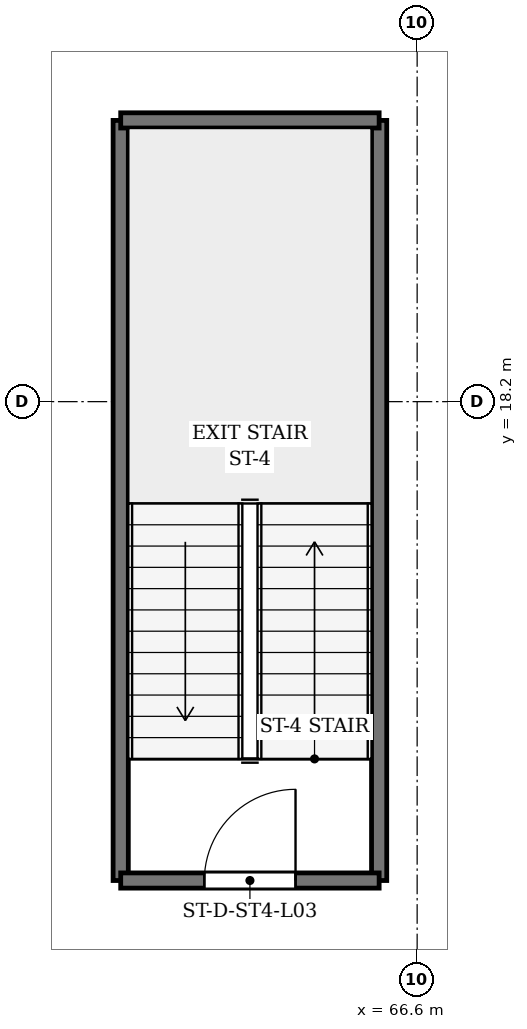
"""IFC4 building model, lengths in metres.
Left out: names, types, materials, properties, quantities, classifications, styles, units other than length and angle.
Written with IfcOpenShell. Run it as: python <this file> out.ifc"""

import sys

from ifc_helpers import new_model, si_unit, direction, frame, frame_2d, origin, place, context, subcontext, project, spatial, rectangle, extrude, source, transform, mapped, element, fill, save


model = new_model("IFC4")
c1 = context("Model", 3, precision=1e-05, world=origin(), true_north=direction((0.0, 1.0)))
c2 = subcontext(c1, "Body", "Model", "MODEL_VIEW")
j1 = project(units=[si_unit("LENGTHUNIT", "METRE"), si_unit("PLANEANGLEUNIT", "RADIAN")], contexts=[c1])
p1 = place(None, origin())
s1 = spatial("IfcSite", under=j1, at=p1, CompositionType="ELEMENT")
p2 = place(p1, origin())
s2 = spatial("IfcBuilding", under=s1, at=p2, CompositionType="ELEMENT")
p3 = place(p2, frame((0.0, 0.0, 14.2)))
s3 = spatial("IfcBuildingStorey", under=s2, at=p3, CompositionType="ELEMENT", Elevation=14.2)
for number, where, z_axis, x_axis in (
    (1, (62.7, 11.9, 0.0), (0.0, 0.0, 1.0), (0.0, 1.0, 0.0)),
    (2, (66.1, 11.9, 0.0), (0.0, 0.0, 1.0), (0.0, 1.0, 0.0)),
):
    element("IfcWall", number, at=place(p3, frame(where, z_axis=z_axis, x_axis=x_axis)), inside=s3, PredefinedType="SHEAR", context=c2, shape_type="SweptSolid", body=[
        extrude(rectangle(XDim=10.0, YDim=0.2, at=frame_2d((5.0, 0.0))), origin(), (0.0, 0.0, 1.0), 4.15),
    ])
p4 = place(p3, frame((62.7, 11.9, 0.0), z_axis=(0.0, 0.0, 1.0), x_axis=(1.0, 0.0, 0.0)))
e3 = element("IfcWall", 3, at=p4, inside=s3, PredefinedType="SHEAR", context=c2, shape_type="SweptSolid", body=[
    extrude(rectangle(XDim=3.4, YDim=0.2, at=frame_2d((1.7, 0.0))), origin(), (0.0, 0.0, 1.0), 4.15),
])
p5 = place(p4, frame((1.1, 0.0, 0.0)))
e4 = element("IfcOpeningElement", 4, at=p5, cuts=e3, PredefinedType="OPENING", context=c2, shape_type="SweptSolid", body=[
    extrude(rectangle(XDim=1.2, YDim=2.15, at=frame_2d((0.6, 1.075))), frame((0.0, 0.11, 0.0), z_axis=(0.0, -1.0, 0.0), x_axis=(1.0, 0.0, 0.0)), (0.0, 0.0, 1.0), 0.22),
])
p6 = place(p3, frame((62.7, 21.9, 0.0), z_axis=(0.0, 0.0, 1.0), x_axis=(1.0, 0.0, 0.0)))
e5 = element("IfcWall", 5, at=p6, inside=s3, PredefinedType="SHEAR", context=c2, shape_type="SweptSolid", body=[
    extrude(rectangle(XDim=3.4, YDim=0.2, at=frame_2d((1.7, 0.0))), origin(), (0.0, 0.0, 1.0), 4.15),
])
m1 = source(origin(), c2, "Body", "SweptSolid", [
    extrude(rectangle(XDim=1.2, YDim=2.15, at=frame_2d((0.6, 1.075))), frame((0.0, 0.025, 0.0), z_axis=(0.0, -1.0, 0.0), x_axis=(1.0, 0.0, 0.0)), (0.0, 0.0, 1.0), 0.05),
])
p7 = place(p5, origin())
e6 = element("IfcDoor", 6, at=p7, inside=s3, OperationType="SINGLE_SWING_RIGHT", PredefinedType="DOOR", context=c2, shape_type="MappedRepresentation", body=[
    mapped(m1, transform((0.0, 0.0, 0.0), x_axis=(1.0, 0.0, 0.0), y_axis=(0.0, 1.0, 0.0), z_axis=(0.0, 0.0, 1.0), scale=1.0)),
])
fill(e4, e6)
save(model, sys.argv[1])
